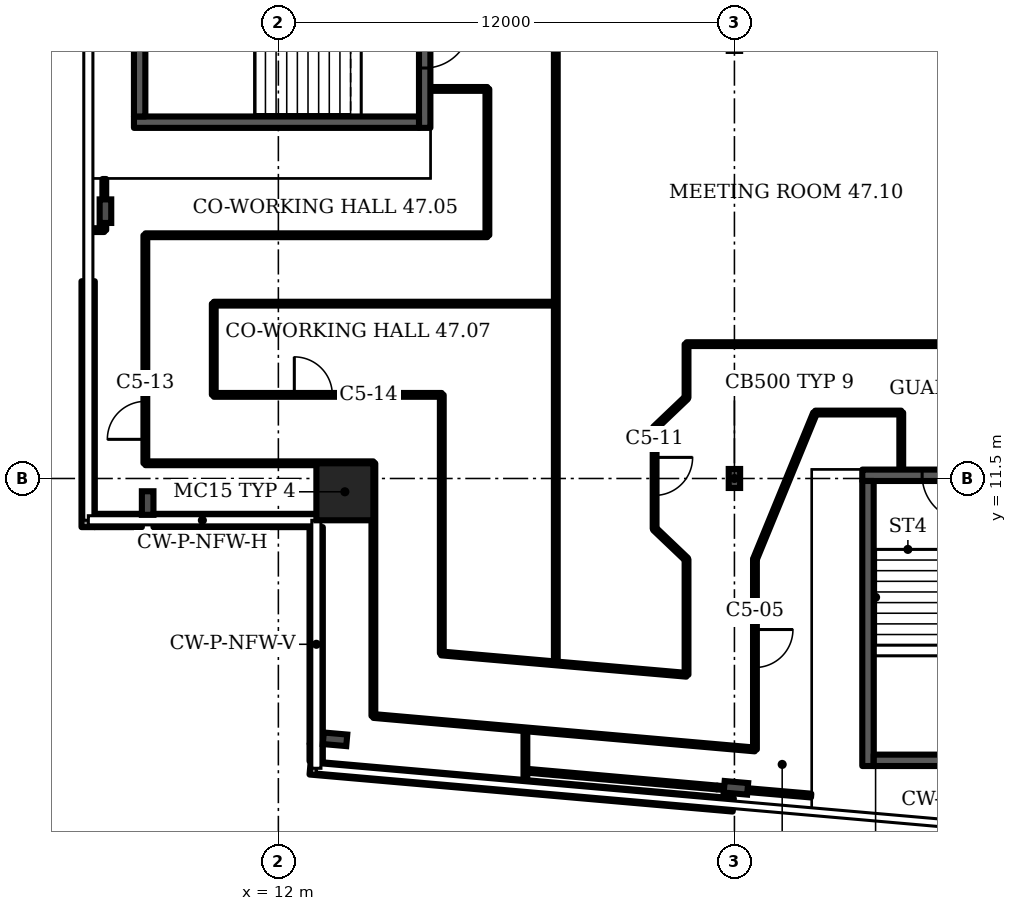
"""IFC4 building model, lengths in metres.
Left out: names, types, materials, properties, quantities, classifications, styles, units other than length and angle.
Written with IfcOpenShell. Run it as: python <this file> out.ifc"""

import sys

from ifc_helpers import new_model, si_unit, direction, frame, frame_2d, origin, origin_2d, place, context, subcontext, project, spatial, rectangle, i_section, extrude, element, fill, save


model = new_model("IFC4")
c1 = context("Model", 3, precision=1e-05, world=origin(), true_north=direction((0.0, 1.0)))
c2 = subcontext(c1, "Body", "Model", "MODEL_VIEW")
j1 = project(units=[si_unit("LENGTHUNIT", "METRE"), si_unit("PLANEANGLEUNIT", "RADIAN")], contexts=[c1])
p1 = place(None, origin())
s1 = spatial("IfcSite", under=j1, at=p1, CompositionType="ELEMENT")
p2 = place(p1, origin())
s2 = spatial("IfcBuilding", under=s1, at=p2, CompositionType="ELEMENT")
p3 = place(p2, frame((0.0, 0.0, 191.5)))
s3 = spatial("IfcBuildingStorey", under=s2, at=p3, CompositionType="ELEMENT", Elevation=191.5)
p4 = place(p3, frame((13.75, 11.15, 0.0), z_axis=(0.0, 0.0, 1.0), x_axis=(1.0, 0.0, 0.0)))
e1 = element("IfcColumn", 1, at=p4, inside=s3, PredefinedType="COLUMN", context=c2, shape_type="SweptSolid", body=[
    extrude(rectangle(XDim=1.5, YDim=1.5, at=origin_2d()), origin(), (0.0, 0.0, 1.0), 3.6),
])
for number, where, z_axis, x_axis in (
    (2, (13.491, 4.637, 0.0), (0.0, 0.0, 1.0), (-0.087, -0.996, 0.0)),
    (3, (24.039, 3.361, 0.0), (0.0, 0.0, 1.0), (-0.087, -0.996, 0.0)),
    (4, (7.45, 18.533, 0.0), (0.0, 0.0, 1.0), (-1.0, 0.0, 0.0)),
    (5, (8.561, 10.854, 0.0), (0.0, 0.0, 1.0), (-1.0, 0.0, 0.0)),
):
    element("IfcColumn", number, at=place(p3, frame(where, z_axis=z_axis, x_axis=x_axis)), inside=s3, PredefinedType="COLUMN", context=c2, shape_type="SweptSolid", body=[
        extrude(i_section(OverallWidth=0.305, OverallDepth=0.62, WebThickness=0.021, FlangeThickness=0.04, FilletRadius=0.027, at=origin_2d()), origin(), (0.0, 0.0, 1.0), 3.6),
    ])
p5 = place(p3, frame((24.0, 11.5, 0.0), z_axis=(0.0, 0.0, 1.0), x_axis=(1.0, 0.0, 0.0)))
e6 = element("IfcColumn", 6, at=p5, inside=s3, PredefinedType="COLUMN", context=c2, shape_type="SweptSolid", body=[
    extrude(i_section(OverallWidth=0.3, OverallDepth=0.5, WebThickness=0.014, FlangeThickness=0.028, FilletRadius=0.027, at=origin_2d()), origin(), (0.0, 0.0, 1.0), 3.6),
])
p6 = place(p3, frame((12.835, 3.885, 0.0), z_axis=(0.0, 0.0, 1.0), x_axis=(0.996199, -0.087154, 0.0)))
e7 = element("IfcWall", 7, at=p6, inside=s3, PredefinedType="SOLIDWALL", context=c2, shape_type="SweptSolid", body=[
    extrude(rectangle(XDim=11.177, YDim=0.35, at=frame_2d((5.588, 0.0))), origin(), (0.0, 0.0, 1.0), 1.0),
])
p7 = place(p3, frame((6.995, 16.69, 0.0), z_axis=(0.0, 0.0, 1.0), x_axis=(0.0, -1.0, 0.0)))
e8 = element("IfcWall", 8, at=p7, inside=s3, PredefinedType="SOLIDWALL", context=c2, shape_type="SweptSolid", body=[
    extrude(rectangle(XDim=6.47, YDim=0.35, at=frame_2d((3.235, 0.0))), origin(), (0.0, 0.0, 1.0), 1.0),
])
p8 = place(p3, frame((7.17, 10.395, 0.0), z_axis=(0.0, 0.0, 1.0), x_axis=(1.0, 0.0, 0.0)))
e9 = element("IfcWall", 9, at=p8, inside=s3, PredefinedType="SOLIDWALL", context=c2, shape_type="SweptSolid", body=[
    extrude(rectangle(XDim=1.238, YDim=0.35, at=frame_2d((0.619, 0.0))), origin(), (0.0, 0.0, 1.0), 1.0),
])
p9 = place(p3, frame((8.713, 10.395, 0.0), z_axis=(0.0, 0.0, 1.0), x_axis=(1.0, 0.0, 0.0)))
e10 = element("IfcWall", 10, at=p9, inside=s3, PredefinedType="SOLIDWALL", context=c2, shape_type="SweptSolid", body=[
    extrude(rectangle(XDim=4.287, YDim=0.35, at=frame_2d((2.143, 0.0))), origin(), (0.0, 0.0, 1.0), 1.0),
])
p10 = place(p3, frame((12.995, 10.22, 0.0), z_axis=(0.0, 0.0, 1.0), x_axis=(0.0, -1.0, 0.0)))
e11 = element("IfcWall", 11, at=p10, inside=s3, PredefinedType="SOLIDWALL", context=c2, shape_type="SweptSolid", body=[
    extrude(rectangle(XDim=5.693, YDim=0.35, at=frame_2d((2.847, 0.0))), origin(), (0.0, 0.0, 1.0), 1.0),
])
p11 = place(p3, frame((12.995, 4.512, 0.0), z_axis=(0.0, 0.0, 1.0), x_axis=(0.0, -1.0, 0.0)))
e12 = element("IfcWall", 12, at=p11, inside=s3, PredefinedType="SOLIDWALL", context=c2, shape_type="SweptSolid", body=[
    extrude(rectangle(XDim=0.454, YDim=0.35, at=frame_2d((0.227, 0.0))), origin(), (0.0, 0.0, 1.0), 1.0),
])
p12 = place(p3, frame((15.85, 20.725, 0.0), z_axis=(0.0, 0.0, 1.0), x_axis=(0.0, 1.0, 0.0)))
e13 = element("IfcWall", 13, at=p12, inside=s3, PredefinedType="SHEAR", context=c2, shape_type="SweptSolid", body=[
    extrude(rectangle(XDim=4.35, YDim=0.3, at=frame_2d((2.175, 0.0))), origin(), (0.0, 0.0, 1.0), 3.2),
])
p13 = place(p12, frame((1.575, 0.0, 0.0)))
e14 = element("IfcOpeningElement", 14, at=p13, cuts=e13, PredefinedType="OPENING", context=c2, shape_type="SweptSolid", body=[
    extrude(rectangle(XDim=1.2, YDim=2.1, at=frame_2d((0.6, 1.05))), frame((0.0, 0.16, 0.0), z_axis=(0.0, -1.0, 0.0), x_axis=(1.0, 0.0, 0.0)), (0.0, 0.0, 1.0), 0.32),
])
p14 = place(p3, frame((27.364, 11.584, 0.0), z_axis=(0.0, 0.0, 1.0), x_axis=(1.0, 0.0, 0.0)))
e15 = element("IfcWall", 15, at=p14, inside=s3, PredefinedType="SHEAR", context=c2, shape_type="SweptSolid", body=[
    extrude(rectangle(XDim=4.35, YDim=0.3, at=frame_2d((2.175, 0.0))), origin(), (0.0, 0.0, 1.0), 3.2),
])
p15 = place(p14, frame((1.575, 0.0, 0.0)))
e16 = element("IfcOpeningElement", 16, at=p15, cuts=e15, PredefinedType="OPENING", context=c2, shape_type="SweptSolid", body=[
    extrude(rectangle(XDim=1.2, YDim=2.1, at=frame_2d((0.6, 1.05))), frame((0.0, 0.16, 0.0), z_axis=(0.0, -1.0, 0.0), x_axis=(1.0, 0.0, 0.0)), (0.0, 0.0, 1.0), 0.32),
])
p16 = place(p3, frame((7.02, 18.035, 0.0), z_axis=(0.0, 0.0, 1.0), x_axis=(1.0, 0.0, 0.0)))
e17 = element("IfcWall", 17, at=p16, inside=s3, PredefinedType="PARTITIONING", context=c2, shape_type="SweptSolid", body=[
    extrude(rectangle(XDim=0.4, YDim=0.1, at=frame_2d((0.2, 0.0))), origin(), (0.0, 0.0, 1.0), 3.2),
])
p17 = place(p3, frame((7.42, 18.035, 0.0), z_axis=(0.0, 0.0, 1.0), x_axis=(0.0, 1.0, 0.0)))
e18 = element("IfcWall", 18, at=p17, inside=s3, PredefinedType="PARTITIONING", context=c2, shape_type="SweptSolid", body=[
    extrude(rectangle(XDim=1.345, YDim=0.1, at=frame_2d((0.672, 0.0))), origin(), (0.0, 0.0, 1.0), 2.58),
])
p18 = place(p3, frame((8.5, 11.9, 0.0), z_axis=(0.0, 0.0, 1.0), x_axis=(0.0, 1.0, 0.0)))
e19 = element("IfcWall", 19, at=p18, inside=s3, PredefinedType="PARTITIONING", context=c2, shape_type="SweptSolid", body=[
    extrude(rectangle(XDim=6.0, YDim=0.1, at=frame_2d((3.0, 0.0))), origin(), (0.0, 0.0, 1.0), 3.2),
])
p19 = place(p18, frame((0.63, 0.0, 0.0)))
e20 = element("IfcOpeningElement", 20, at=p19, cuts=e19, PredefinedType="OPENING", context=c2, shape_type="SweptSolid", body=[
    extrude(rectangle(XDim=1.0, YDim=2.1, at=frame_2d((0.5, 1.05))), frame((0.0, 0.06, 0.0), z_axis=(0.0, -1.0, 0.0), x_axis=(1.0, 0.0, 0.0)), (0.0, 0.0, 1.0), 0.12),
])
p20 = place(p3, frame((8.5, 11.9, 0.0), z_axis=(0.0, 0.0, 1.0), x_axis=(1.0, 0.0, 0.0)))
e21 = element("IfcWall", 21, at=p20, inside=s3, PredefinedType="PARTITIONING", context=c2, shape_type="SweptSolid", body=[
    extrude(rectangle(XDim=6.0, YDim=0.1, at=frame_2d((3.0, 0.0))), origin(), (0.0, 0.0, 1.0), 3.2),
])
p21 = place(p3, frame((8.5, 17.9, 0.0), z_axis=(0.0, 0.0, 1.0), x_axis=(1.0, 0.0, 0.0)))
e22 = element("IfcWall", 22, at=p21, inside=s3, PredefinedType="PARTITIONING", context=c2, shape_type="SweptSolid", body=[
    extrude(rectangle(XDim=9.0, YDim=0.1, at=frame_2d((4.5, 0.0))), origin(), (0.0, 0.0, 1.0), 3.2),
])
p22 = place(p3, frame((10.3, 13.7, 0.0), z_axis=(0.0, 0.0, 1.0), x_axis=(0.0, 1.0, 0.0)))
e23 = element("IfcWall", 23, at=p22, inside=s3, PredefinedType="PARTITIONING", context=c2, shape_type="SweptSolid", body=[
    extrude(rectangle(XDim=2.4, YDim=0.1, at=frame_2d((1.2, 0.0))), origin(), (0.0, 0.0, 1.0), 3.2),
])
p23 = place(p3, frame((10.3, 13.7, 0.0), z_axis=(0.0, 0.0, 1.0), x_axis=(1.0, 0.0, 0.0)))
e24 = element("IfcWall", 24, at=p23, inside=s3, PredefinedType="PARTITIONING", context=c2, shape_type="SweptSolid", body=[
    extrude(rectangle(XDim=6.0, YDim=0.1, at=frame_2d((3.0, 0.0))), origin(), (0.0, 0.0, 1.0), 3.2),
])
p24 = place(p23, frame((2.12, 0.0, 0.0)))
e25 = element("IfcOpeningElement", 25, at=p24, cuts=e24, PredefinedType="OPENING", context=c2, shape_type="SweptSolid", body=[
    extrude(rectangle(XDim=1.0, YDim=2.1, at=frame_2d((0.5, 1.05))), frame((0.0, 0.06, 0.0), z_axis=(0.0, -1.0, 0.0), x_axis=(1.0, 0.0, 0.0)), (0.0, 0.0, 1.0), 0.12),
])
p25 = place(p3, frame((10.3, 16.1, 0.0), z_axis=(0.0, 0.0, 1.0), x_axis=(1.0, 0.0, 0.0)))
e26 = element("IfcWall", 26, at=p25, inside=s3, PredefinedType="PARTITIONING", context=c2, shape_type="SweptSolid", body=[
    extrude(rectangle(XDim=9.0, YDim=0.1, at=frame_2d((4.5, 0.0))), origin(), (0.0, 0.0, 1.0), 3.2),
])
p26 = place(p3, frame((14.5, 5.25, 0.0), z_axis=(0.0, 0.0, 1.0), x_axis=(0.0, 1.0, 0.0)))
e27 = element("IfcWall", 27, at=p26, inside=s3, PredefinedType="PARTITIONING", context=c2, shape_type="SweptSolid", body=[
    extrude(rectangle(XDim=6.65, YDim=0.1, at=frame_2d((3.325, 0.0))), origin(), (0.0, 0.0, 1.0), 3.2),
])
p27 = place(p3, frame((16.02, 21.75, 0.0), z_axis=(0.0, 0.0, 1.0), x_axis=(1.0, 0.0, 0.0)))
e28 = element("IfcWall", 28, at=p27, inside=s3, PredefinedType="PARTITIONING", context=c2, shape_type="SweptSolid", body=[
    extrude(rectangle(XDim=1.48, YDim=0.1, at=frame_2d((0.74, 0.0))), origin(), (0.0, 0.0, 1.0), 3.2),
])
p28 = place(p3, frame((16.3, 6.9, 0.0), z_axis=(0.0, 0.0, 1.0), x_axis=(0.0, 1.0, 0.0)))
e29 = element("IfcWall", 29, at=p28, inside=s3, PredefinedType="PARTITIONING", context=c2, shape_type="SweptSolid", body=[
    extrude(rectangle(XDim=6.8, YDim=0.1, at=frame_2d((3.4, 0.0))), origin(), (0.0, 0.0, 1.0), 3.2),
])
p29 = place(p3, frame((17.5, 17.9, 0.0), z_axis=(0.0, 0.0, 1.0), x_axis=(0.0, 1.0, 0.0)))
e30 = element("IfcWall", 30, at=p29, inside=s3, PredefinedType="PARTITIONING", context=c2, shape_type="SweptSolid", body=[
    extrude(rectangle(XDim=3.85, YDim=0.1, at=frame_2d((1.925, 0.0))), origin(), (0.0, 0.0, 1.0), 3.2),
])
p30 = place(p3, frame((18.5, 3.425, 0.0), z_axis=(0.0, 0.0, 1.0), x_axis=(0.0, 1.0, 0.0)))
e31 = element("IfcWall", 31, at=p30, inside=s3, PredefinedType="PARTITIONING", context=c2, shape_type="SweptSolid", body=[
    extrude(rectangle(XDim=1.475, YDim=0.1, at=frame_2d((0.737, 0.0))), origin(), (0.0, 0.0, 1.0), 2.58),
])
p31 = place(p3, frame((19.3, 6.705, 0.0), z_axis=(0.0, 0.0, 1.0), x_axis=(0.0, 1.0, 0.0)))
e32 = element("IfcWall", 32, at=p31, inside=s3, PredefinedType="PARTITIONING", context=c2, shape_type="SweptSolid", body=[
    extrude(rectangle(XDim=20.495, YDim=0.1, at=frame_2d((10.248, 0.0))), origin(), (0.0, 0.0, 1.0), 3.2),
])
p32 = place(p3, frame((21.9, 12.825, 0.0), z_axis=(0.0, 0.0, 1.0), x_axis=(0.724157, 0.689643, 0.0)))
e33 = element("IfcWall", 33, at=p32, inside=s3, PredefinedType="PARTITIONING", context=c2, shape_type="SweptSolid", body=[
    extrude(rectangle(XDim=1.16, YDim=0.1, at=frame_2d((0.58, 0.0))), origin(), (0.0, 0.0, 1.0), 3.2),
])
p33 = place(p3, frame((21.9, 10.175, 0.0), z_axis=(0.0, 0.0, 1.0), x_axis=(0.0, 1.0, 0.0)))
e34 = element("IfcWall", 34, at=p33, inside=s3, PredefinedType="PARTITIONING", context=c2, shape_type="SweptSolid", body=[
    extrude(rectangle(XDim=2.65, YDim=0.1, at=frame_2d((1.325, 0.0))), origin(), (0.0, 0.0, 1.0), 3.2),
])
p34 = place(p33, frame((0.88, 0.0, 0.0)))
e35 = element("IfcOpeningElement", 35, at=p34, cuts=e34, PredefinedType="OPENING", context=c2, shape_type="SweptSolid", body=[
    extrude(rectangle(XDim=1.0, YDim=2.1, at=frame_2d((0.5, 1.05))), frame((0.0, 0.06, 0.0), z_axis=(0.0, -1.0, 0.0), x_axis=(1.0, 0.0, 0.0)), (0.0, 0.0, 1.0), 0.12),
])
p35 = place(p3, frame((22.74, 9.375, 0.0), z_axis=(0.0, 0.0, 1.0), x_axis=(-0.724157, 0.689643, 0.0)))
e36 = element("IfcWall", 36, at=p35, inside=s3, PredefinedType="PARTITIONING", context=c2, shape_type="SweptSolid", body=[
    extrude(rectangle(XDim=1.16, YDim=0.1, at=frame_2d((0.58, 0.0))), origin(), (0.0, 0.0, 1.0), 3.2),
])
p36 = place(p3, frame((22.74, 6.335, 0.0), z_axis=(0.0, 0.0, 1.0), x_axis=(-0.996229, 0.086722, 0.0)))
e37 = element("IfcWall", 37, at=p36, inside=s3, PredefinedType="PARTITIONING", context=c2, shape_type="SweptSolid", body=[
    extrude(rectangle(XDim=6.478, YDim=0.1, at=frame_2d((3.239, 0.0))), origin(), (0.0, 0.0, 1.0), 3.2),
])
p37 = place(p3, frame((22.74, 6.335, 0.0), z_axis=(0.0, 0.0, 1.0), x_axis=(0.0, 1.0, 0.0)))
e38 = element("IfcWall", 38, at=p37, inside=s3, PredefinedType="PARTITIONING", context=c2, shape_type="SweptSolid", body=[
    extrude(rectangle(XDim=3.04, YDim=0.1, at=frame_2d((1.52, 0.0))), origin(), (0.0, 0.0, 1.0), 3.2),
])
p38 = place(p3, frame((22.74, 13.625, 0.0), z_axis=(0.0, 0.0, 1.0), x_axis=(0.0, 1.0, 0.0)))
e39 = element("IfcWall", 39, at=p38, inside=s3, PredefinedType="PARTITIONING", context=c2, shape_type="SweptSolid", body=[
    extrude(rectangle(XDim=1.41, YDim=0.1, at=frame_2d((0.705, 0.0))), origin(), (0.0, 0.0, 1.0), 3.2),
])
p39 = place(p3, frame((22.74, 15.035, 0.0), z_axis=(0.0, 0.0, 1.0), x_axis=(1.0, 0.0, 0.0)))
e40 = element("IfcWall", 40, at=p39, inside=s3, PredefinedType="PARTITIONING", context=c2, shape_type="SweptSolid", body=[
    extrude(rectangle(XDim=13.6, YDim=0.1, at=frame_2d((6.8, 0.0))), origin(), (0.0, 0.0, 1.0), 3.2),
])
p40 = place(p39, frame((10.51, 0.0, 0.0)))
e41 = element("IfcOpeningElement", 41, at=p40, cuts=e40, PredefinedType="OPENING", context=c2, shape_type="SweptSolid", body=[
    extrude(rectangle(XDim=1.0, YDim=2.1, at=frame_2d((0.5, 1.05))), frame((0.0, 0.06, 0.0), z_axis=(0.0, -1.0, 0.0), x_axis=(1.0, 0.0, 0.0)), (0.0, 0.0, 1.0), 0.12),
])
p41 = place(p3, frame((23.54, 3.37, 0.0), z_axis=(0.0, 0.0, 1.0), x_axis=(-0.996148, 0.087735, 0.0)))
e42 = element("IfcWall", 42, at=p41, inside=s3, PredefinedType="PARTITIONING", context=c2, shape_type="SweptSolid", body=[
    extrude(rectangle(XDim=5.014, YDim=0.1, at=frame_2d((2.507, 0.0))), origin(), (0.0, 0.0, 1.0), 2.58),
])
p42 = place(p3, frame((24.54, 9.375, 0.0), z_axis=(0.0, 0.0, 1.0), x_axis=(0.380187, 0.924914, 0.0)))
e43 = element("IfcWall", 43, at=p42, inside=s3, PredefinedType="PARTITIONING", context=c2, shape_type="SweptSolid", body=[
    extrude(rectangle(XDim=4.156, YDim=0.1, at=frame_2d((2.078, 0.0))), origin(), (0.0, 0.0, 1.0), 3.2),
])
p43 = place(p3, frame((24.54, 4.37, 0.0), z_axis=(0.0, 0.0, 1.0), x_axis=(0.0, 1.0, 0.0)))
e44 = element("IfcWall", 44, at=p43, inside=s3, PredefinedType="PARTITIONING", context=c2, shape_type="SweptSolid", body=[
    extrude(rectangle(XDim=5.005, YDim=0.1, at=frame_2d((2.502, 0.0))), origin(), (0.0, 0.0, 1.0), 3.2),
])
p44 = place(p43, frame((2.156, 0.0, 0.0)))
e45 = element("IfcOpeningElement", 45, at=p44, cuts=e44, PredefinedType="OPENING", context=c2, shape_type="SweptSolid", body=[
    extrude(rectangle(XDim=1.0, YDim=2.1, at=frame_2d((0.5, 1.05))), frame((0.0, 0.06, 0.0), z_axis=(0.0, -1.0, 0.0), x_axis=(1.0, 0.0, 0.0)), (0.0, 0.0, 1.0), 0.12),
])
p45 = place(p3, frame((24.54, 4.37, 0.0), z_axis=(0.0, 0.0, 1.0), x_axis=(-0.996178, 0.08739, 0.0)))
e46 = element("IfcWall", 46, at=p45, inside=s3, PredefinedType="PARTITIONING", context=c2, shape_type="SweptSolid", body=[
    extrude(rectangle(XDim=10.077, YDim=0.1, at=frame_2d((5.039, 0.0))), origin(), (0.0, 0.0, 1.0), 3.2),
])
p46 = place(p3, frame((26.019, 3.157, 0.0), z_axis=(0.0, 0.0, 1.0), x_axis=(-0.996317, 0.085749, 0.0)))
e47 = element("IfcWall", 47, at=p46, inside=s3, PredefinedType="PARTITIONING", context=c2, shape_type="SweptSolid", body=[
    extrude(rectangle(XDim=2.489, YDim=0.1, at=frame_2d((1.244, 0.0))), origin(), (0.0, 0.0, 1.0), 2.58),
])
p47 = place(p3, frame((26.125, 13.235, 0.0), z_axis=(0.0, 0.0, 1.0), x_axis=(1.0, 0.0, 0.0)))
e48 = element("IfcWall", 48, at=p47, inside=s3, PredefinedType="PARTITIONING", context=c2, shape_type="SweptSolid", body=[
    extrude(rectangle(XDim=2.265, YDim=0.1, at=frame_2d((1.132, 0.0))), origin(), (0.0, 0.0, 1.0), 3.2),
])
p48 = place(p3, frame((28.39, 11.754, 0.0), z_axis=(0.0, 0.0, 1.0), x_axis=(0.0, 1.0, 0.0)))
e49 = element("IfcWall", 49, at=p48, inside=s3, PredefinedType="PARTITIONING", context=c2, shape_type="SweptSolid", body=[
    extrude(rectangle(XDim=1.481, YDim=0.1, at=frame_2d((0.74, 0.0))), origin(), (0.0, 0.0, 1.0), 3.2),
])
p49 = place(p3, frame((8.2, 20.875, 0.0), z_axis=(0.0, 0.0, 1.0), x_axis=(1.0, 0.0, 0.0)))
e50 = element("IfcWall", 50, at=p49, inside=s3, PredefinedType="SHEAR", context=c2, shape_type="SweptSolid", body=[
    extrude(rectangle(XDim=7.5, YDim=0.3, at=frame_2d((3.75, 0.0))), origin(), (0.0, 0.0, 1.0), 3.2),
])
p50 = place(p3, frame((8.35, 21.025, 0.0), z_axis=(0.0, 0.0, 1.0), x_axis=(0.0, 1.0, 0.0)))
e51 = element("IfcWall", 51, at=p50, inside=s3, PredefinedType="SHEAR", context=c2, shape_type="SweptSolid", body=[
    extrude(rectangle(XDim=3.75, YDim=0.3, at=frame_2d((1.875, 0.0))), origin(), (0.0, 0.0, 1.0), 3.2),
])
p51 = place(p3, frame((27.514, 3.934, 0.0), z_axis=(0.0, 0.0, 1.0), x_axis=(0.0, 1.0, 0.0)))
e52 = element("IfcWall", 52, at=p51, inside=s3, PredefinedType="SHEAR", context=c2, shape_type="SweptSolid", body=[
    extrude(rectangle(XDim=7.5, YDim=0.3, at=frame_2d((3.75, 0.0))), origin(), (0.0, 0.0, 1.0), 3.2),
])
p52 = place(p3, frame((27.664, 4.084, 0.0), z_axis=(0.0, 0.0, 1.0), x_axis=(1.0, 0.0, 0.0)))
e53 = element("IfcWall", 53, at=p52, inside=s3, PredefinedType="SHEAR", context=c2, shape_type="SweptSolid", body=[
    extrude(rectangle(XDim=3.75, YDim=0.3, at=frame_2d((1.875, 0.0))), origin(), (0.0, 0.0, 1.0), 3.2),
])
p53 = place(p13, origin())
e54 = element("IfcDoor", 54, at=p53, inside=s3, OperationType="SINGLE_SWING_RIGHT", PredefinedType="DOOR", context=c2, shape_type="SweptSolid", body=[
    extrude(rectangle(XDim=1.2, YDim=2.1, at=frame_2d((0.6, 1.05))), frame((0.0, 0.025, 0.0), z_axis=(0.0, -1.0, 0.0), x_axis=(1.0, 0.0, 0.0)), (0.0, 0.0, 1.0), 0.05),
])
fill(e14, e54)
p54 = place(p15, origin())
e55 = element("IfcDoor", 55, at=p54, inside=s3, OperationType="SINGLE_SWING_RIGHT", PredefinedType="DOOR", context=c2, shape_type="SweptSolid", body=[
    extrude(rectangle(XDim=1.2, YDim=2.1, at=frame_2d((0.6, 1.05))), frame((0.0, 0.025, 0.0), z_axis=(0.0, -1.0, 0.0), x_axis=(1.0, 0.0, 0.0)), (0.0, 0.0, 1.0), 0.05),
])
fill(e16, e55)
p55 = place(p44, origin())
e56 = element("IfcDoor", 56, at=p55, inside=s3, OperationType="SINGLE_SWING_RIGHT", PredefinedType="DOOR", context=c2, shape_type="SweptSolid", body=[
    extrude(rectangle(XDim=1.0, YDim=2.1, at=frame_2d((0.5, 1.05))), frame((0.0, 0.025, 0.0), z_axis=(0.0, -1.0, 0.0), x_axis=(1.0, 0.0, 0.0)), (0.0, 0.0, 1.0), 0.05),
])
fill(e45, e56)
p56 = place(p34, origin())
e57 = element("IfcDoor", 57, at=p56, inside=s3, OperationType="SINGLE_SWING_RIGHT", PredefinedType="DOOR", context=c2, shape_type="SweptSolid", body=[
    extrude(rectangle(XDim=1.0, YDim=2.1, at=frame_2d((0.5, 1.05))), frame((0.0, 0.025, 0.0), z_axis=(0.0, -1.0, 0.0), x_axis=(1.0, 0.0, 0.0)), (0.0, 0.0, 1.0), 0.05),
])
fill(e35, e57)
p57 = place(p19, origin())
e58 = element("IfcDoor", 58, at=p57, inside=s3, OperationType="SINGLE_SWING_LEFT", PredefinedType="DOOR", context=c2, shape_type="SweptSolid", body=[
    extrude(rectangle(XDim=1.0, YDim=2.1, at=frame_2d((0.5, 1.05))), frame((0.0, 0.025, 0.0), z_axis=(0.0, -1.0, 0.0), x_axis=(1.0, 0.0, 0.0)), (0.0, 0.0, 1.0), 0.05),
])
fill(e20, e58)
p58 = place(p24, origin())
e59 = element("IfcDoor", 59, at=p58, inside=s3, OperationType="SINGLE_SWING_LEFT", PredefinedType="DOOR", context=c2, shape_type="SweptSolid", body=[
    extrude(rectangle(XDim=1.0, YDim=2.1, at=frame_2d((0.5, 1.05))), frame((0.0, 0.025, 0.0), z_axis=(0.0, -1.0, 0.0), x_axis=(1.0, 0.0, 0.0)), (0.0, 0.0, 1.0), 0.05),
])
fill(e25, e59)
save(model, sys.argv[1])
